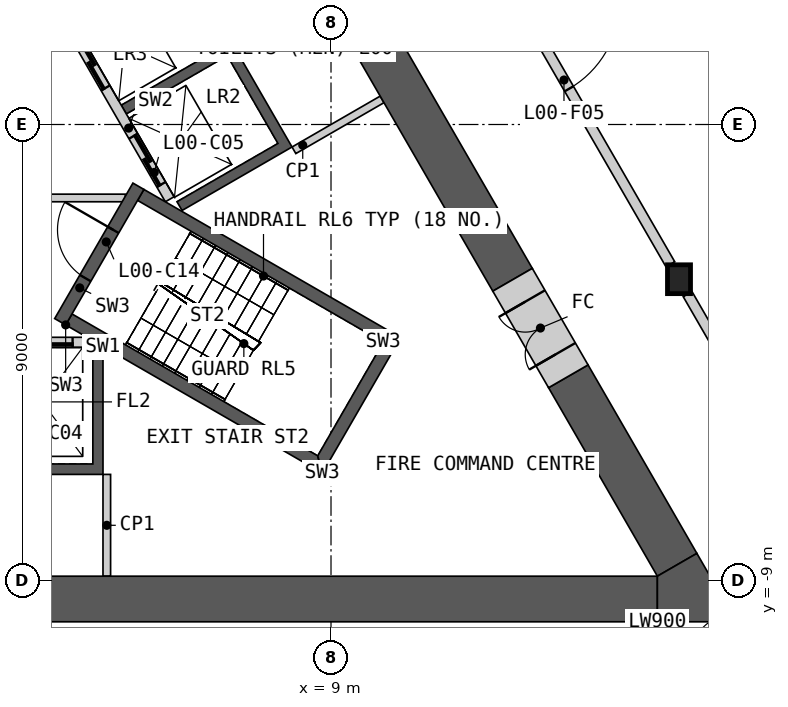
"""IFC4 building model, lengths in metres.
Left out: names, types, materials, properties, quantities, classifications, styles, units other than length and angle.
Written with IfcOpenShell. Run it as: python <this file> out.ifc"""

import sys

from ifc_helpers import new_model, si_unit, direction, frame, frame_2d, origin, origin_2d, place, context, subcontext, project, spatial, polyline, rectangle, i_section, outline, extrude, element, fill, save


model = new_model("IFC4")
c1 = context("Model", 3, precision=1e-05, world=origin(), true_north=direction((0.0, 1.0)))
c2 = subcontext(c1, "Body", "Model", "MODEL_VIEW")
j1 = project(units=[si_unit("LENGTHUNIT", "METRE"), si_unit("PLANEANGLEUNIT", "RADIAN")], contexts=[c1])
p1 = place(None, origin())
s1 = spatial("IfcSite", under=j1, at=p1, CompositionType="ELEMENT")
p2 = place(p1, origin())
s2 = spatial("IfcBuilding", under=s1, at=p2, CompositionType="ELEMENT")
p3 = place(p2, origin())
s3 = spatial("IfcBuildingStorey", under=s2, at=p3, CompositionType="ELEMENT", Elevation=0.0)
p4 = place(p3, frame((15.868, -3.054, 0.0), z_axis=(0.0, 0.0, 1.0), x_axis=(1.0, 0.0, 0.0)))
e1 = element("IfcColumn", 1, at=p4, inside=s3, PredefinedType="COLUMN", context=c2, shape_type="SweptSolid", body=[
    extrude(i_section(OverallWidth=0.454, OverallDepth=0.57, WebThickness=0.078, FlangeThickness=0.125, at=origin_2d()), origin(), (0.0, 0.0, 1.0), 10.0),
])
p5 = place(p3, origin())
e2 = element("IfcWall", 2, at=p5, inside=s3, PredefinedType="SHEAR", context=c2, shape_type="SweptSolid", body=[
    extrude(outline(polyline([(4.5, -4.4), (4.5, -6.906), (-4.5, -6.906), (-4.5, -4.4), (-4.3, -4.4), (-4.3, -6.7), (-2.3, -6.7), (-2.3, -4.4), (-2.1, -4.4), (-2.1, -6.7), (-0.1, -6.7), (-0.1, -4.4), (0.1, -4.4), (0.1, -6.7), (2.1, -6.7), (2.1, -4.4), (2.3, -4.4), (2.3, -6.7), (4.3, -6.7), (4.3, -4.4), (4.5, -4.4)])), origin(), (0.0, 0.0, 1.0), 9.55),
])
p6 = place(p3, frame((-4.187, -4.3, 0.0), z_axis=(0.0, 0.0, 1.0), x_axis=(1.0, 0.0, 0.0)))
e3 = element("IfcWall", 3, at=p6, inside=s3, PredefinedType="SOLIDWALL", context=c2, shape_type="SweptSolid", body=[
    extrude(rectangle(XDim=8.373, YDim=0.2, at=frame_2d((4.187, 0.0))), origin(), (0.0, 0.0, 1.0), 9.55),
])
p7 = place(p6, frame((0.287, 0.0, 0.0)))
e4 = element("IfcOpeningElement", 4, at=p7, cuts=e3, PredefinedType="OPENING", context=c2, shape_type="SweptSolid", body=[
    extrude(rectangle(XDim=1.2, YDim=2.1, at=frame_2d((0.6, 1.05))), frame((0.0, 0.11, 0.0), z_axis=(0.0, -1.0, 0.0), x_axis=(1.0, 0.0, 0.0)), (0.0, 0.0, 1.0), 0.22),
])
p8 = place(p6, frame((2.387, 0.0, 0.0)))
e5 = element("IfcOpeningElement", 5, at=p8, cuts=e3, PredefinedType="OPENING", context=c2, shape_type="SweptSolid", body=[
    extrude(rectangle(XDim=1.4, YDim=2.1, at=frame_2d((0.7, 1.05))), frame((0.0, 0.11, 0.0), z_axis=(0.0, -1.0, 0.0), x_axis=(1.0, 0.0, 0.0)), (0.0, 0.0, 1.0), 0.22),
])
p9 = place(p6, frame((4.737, 0.0, 0.0)))
e6 = element("IfcOpeningElement", 6, at=p9, cuts=e3, PredefinedType="OPENING", context=c2, shape_type="SweptSolid", body=[
    extrude(rectangle(XDim=1.1, YDim=2.1, at=frame_2d((0.55, 1.05))), frame((0.0, 0.11, 0.0), z_axis=(0.0, -1.0, 0.0), x_axis=(1.0, 0.0, 0.0)), (0.0, 0.0, 1.0), 0.22),
])
p10 = place(p6, frame((6.887, 0.0, 0.0)))
e7 = element("IfcOpeningElement", 7, at=p10, cuts=e3, PredefinedType="OPENING", context=c2, shape_type="SweptSolid", body=[
    extrude(rectangle(XDim=1.2, YDim=2.1, at=frame_2d((0.6, 1.05))), frame((0.0, 0.11, 0.0), z_axis=(0.0, -1.0, 0.0), x_axis=(1.0, 0.0, 0.0)), (0.0, 0.0, 1.0), 0.22),
])
p11 = place(p3, origin())
e8 = element("IfcWall", 8, at=p11, inside=s3, PredefinedType="SHEAR", context=c2, shape_type="SweptSolid", body=[
    extrude(outline(polyline([(2.66, 4.192), (4.831, 5.445), (8.231, -0.444), (6.061, -1.697), (5.96, -1.524), (7.952, -0.374), (6.952, 1.358), (4.96, 0.208), (4.861, 0.381), (6.852, 1.531), (5.852, 3.263), (3.861, 2.113), (3.76, 2.287), (5.752, 3.437), (4.752, 5.169), (2.76, 4.019), (2.66, 4.192)])), origin(), (0.0, 0.0, 1.0), 9.55),
])
p12 = place(p3, frame((5.817, -1.476, 0.0), z_axis=(0.0, 0.0, 1.0), x_axis=(-0.499992876559, 0.866029516466, 0.0)))
e9 = element("IfcWall", 9, at=p12, inside=s3, PredefinedType="SOLIDWALL", context=c2, shape_type="SweptSolid", body=[
    extrude(rectangle(XDim=6.486, YDim=0.2, at=frame_2d((3.243, 0.0))), origin(), (0.0, 0.0, 1.0), 9.55),
])
p13 = place(p12, frame((0.337, 0.0, 0.0)))
e10 = element("IfcOpeningElement", 10, at=p13, cuts=e9, PredefinedType="OPENING", context=c2, shape_type="SweptSolid", body=[
    extrude(rectangle(XDim=1.1, YDim=2.1, at=frame_2d((0.55, 1.05))), frame((0.0, 0.11, 0.0), z_axis=(0.0, -1.0, 0.0), x_axis=(1.0, 0.0, 0.0)), (0.0, 0.0, 1.0), 0.22),
])
p14 = place(p12, frame((2.537, 0.0, 0.0)))
e11 = element("IfcOpeningElement", 11, at=p14, cuts=e9, PredefinedType="OPENING", context=c2, shape_type="SweptSolid", body=[
    extrude(rectangle(XDim=1.1, YDim=2.1, at=frame_2d((0.55, 1.05))), frame((0.0, 0.11, 0.0), z_axis=(0.0, -1.0, 0.0), x_axis=(1.0, 0.0, 0.0)), (0.0, 0.0, 1.0), 0.22),
])
p15 = place(p12, frame((4.737, 0.0, 0.0)))
e12 = element("IfcOpeningElement", 12, at=p15, cuts=e9, PredefinedType="OPENING", context=c2, shape_type="SweptSolid", body=[
    extrude(rectangle(XDim=1.1, YDim=2.1, at=frame_2d((0.55, 1.05))), frame((0.0, 0.11, 0.0), z_axis=(0.0, -1.0, 0.0), x_axis=(1.0, 0.0, 0.0)), (0.0, 0.0, 1.0), 0.22),
])
p16 = place(p3, frame((-4.941, -1.45, 0.0), z_axis=(0.0, 0.0, 1.0), x_axis=(1.0, 0.0, 0.0)))
e13 = element("IfcWall", 13, at=p16, inside=s3, PredefinedType="PARTITIONING", context=c2, shape_type="SweptSolid", body=[
    extrude(rectangle(XDim=9.882, YDim=0.15, at=frame_2d((4.941, 0.0))), origin(), (0.0, 0.0, 1.0), 9.55),
])
p17 = place(p16, frame((4.391, 0.0, 0.0)))
e14 = element("IfcOpeningElement", 14, at=p17, cuts=e13, PredefinedType="OPENING", context=c2, shape_type="SweptSolid", body=[
    extrude(rectangle(XDim=1.1, YDim=2.1, at=frame_2d((0.55, 1.05))), frame((0.0, 0.085, 0.0), z_axis=(0.0, -1.0, 0.0), x_axis=(1.0, 0.0, 0.0)), (0.0, 0.0, 1.0), 0.17),
])
p18 = place(p16, frame((0.341, 0.0, 0.0)))
e15 = element("IfcOpeningElement", 15, at=p18, cuts=e13, PredefinedType="OPENING", context=c2, shape_type="SweptSolid", body=[
    extrude(rectangle(XDim=1.8, YDim=2.1, at=frame_2d((0.9, 1.05))), frame((0.0, 0.085, 0.0), z_axis=(0.0, -1.0, 0.0), x_axis=(1.0, 0.0, 0.0)), (0.0, 0.0, 1.0), 0.17),
])
p19 = place(p3, origin())
e16 = element("IfcWall", 16, at=p19, inside=s3, PredefinedType="SHEAR", context=c2, shape_type="SweptSolid", body=[
    extrude(outline(polyline([(3.763, -3.956), (8.83, -6.881), (8.738, -6.539), (3.888, -3.739), (3.763, -3.956)])), origin(), (0.0, 0.0, 1.0), 9.55),
])
p20 = place(p3, origin())
e17 = element("IfcWall", 17, at=p20, inside=s3, PredefinedType="SHEAR", context=c2, shape_type="SweptSolid", body=[
    extrude(outline(polyline([(8.83, -6.881), (10.374, -4.206), (10.032, -4.298), (8.738, -6.539), (8.83, -6.881)])), origin(), (0.0, 0.0, 1.0), 9.55),
])
p21 = place(p3, origin())
e18 = element("IfcWall", 18, at=p21, inside=s3, PredefinedType="SHEAR", context=c2, shape_type="SweptSolid", body=[
    extrude(outline(polyline([(10.032, -4.298), (10.374, -4.206), (5.307, -1.281), (5.182, -1.498), (10.032, -4.298)])), origin(), (0.0, 0.0, 1.0), 9.55),
])
p22 = place(p3, frame((3.655, -3.893, 0.0), z_axis=(0.0, 0.0, 1.0), x_axis=(0.499982516597, 0.866035497597, 0.0)))
e19 = element("IfcWall", 19, at=p22, inside=s3, PredefinedType="SHEAR", context=c2, shape_type="SweptSolid", body=[
    extrude(rectangle(XDim=3.088, YDim=0.25, at=frame_2d((1.544, 0.0))), origin(), (0.0, 0.0, 1.0), 9.55),
])
p23 = place(p22, frame((0.994, 0.0, 0.0)))
e20 = element("IfcOpeningElement", 20, at=p23, cuts=e19, PredefinedType="OPENING", context=c2, shape_type="SweptSolid", body=[
    extrude(rectangle(XDim=1.1, YDim=2.1, at=frame_2d((0.55, 1.05))), frame((0.0, 0.135, 0.0), z_axis=(0.0, -1.0, 0.0), x_axis=(1.0, 0.0, 0.0)), (0.0, 0.0, 1.0), 0.27),
])
p24 = place(p3, frame((4.575, -6.906, 0.0), z_axis=(0.0, 0.0, 1.0), x_axis=(0.0, -1.0, 0.0)))
e21 = element("IfcWall", 21, at=p24, inside=s3, PredefinedType="PARTITIONING", context=c2, shape_type="SweptSolid", body=[
    extrude(rectangle(XDim=2.009, YDim=0.15, at=frame_2d((1.004, 0.0))), origin(), (0.0, 0.0, 1.0), 9.55),
])
p25 = place(p3, frame((8.268, -0.509, 0.0), z_axis=(0.0, 0.0, 1.0), x_axis=(0.866035824272, 0.499981950752, 0.0)))
e22 = element("IfcWall", 22, at=p25, inside=s3, PredefinedType="PARTITIONING", context=c2, shape_type="SweptSolid", body=[
    extrude(rectangle(XDim=2.009, YDim=0.15, at=frame_2d((1.004, 0.0))), origin(), (0.0, 0.0, 1.0), 9.55),
])
p26 = place(p3, frame((1.1, -9.365, 0.0), z_axis=(0.0, 0.0, 1.0), x_axis=(1.0, 0.0, 0.0)))
e23 = element("IfcWall", 23, at=p26, inside=s3, PredefinedType="SHEAR", context=c2, shape_type="SweptSolid", body=[
    extrude(rectangle(XDim=14.341, YDim=0.9, at=frame_2d((7.17, 0.0))), origin(), (0.0, 0.0, 1.0), 9.55),
])
p27 = place(p3, frame((12.583, -3.065, 0.0), z_axis=(0.0, 0.0, 1.0), x_axis=(-0.49998745675, 0.866032645512, 0.0)))
e24 = element("IfcWall", 24, at=p27, inside=s3, PredefinedType="SHEAR", context=c2, shape_type="SweptSolid", body=[
    extrude(rectangle(XDim=6.646, YDim=0.9, at=frame_2d((3.323, 0.0))), origin(), (0.0, 0.0, 1.0), 9.55),
])
p28 = place(p3, frame((15.831, -8.69, 0.0), z_axis=(0.0, 0.0, 1.0), x_axis=(-0.499996331799, 0.866027521611, 0.0)))
e25 = element("IfcWall", 25, at=p28, inside=s3, PredefinedType="SHEAR", context=c2, shape_type="SweptSolid", body=[
    extrude(rectangle(XDim=4.295, YDim=0.9, at=frame_2d((2.148, 0.0))), origin(), (0.0, 0.0, 1.0), 9.55),
])
p29 = place(p3, origin())
e26 = element("IfcWall", 26, at=p29, inside=s3, PredefinedType="SHEAR", context=c2, shape_type="SweptSolid", body=[
    extrude(outline(polyline([(15.441, -9.815), (15.441, -8.915), (16.221, -8.465), (17.0, -9.815), (15.441, -9.815)])), origin(), (0.0, 0.0, 1.0), 9.55),
])
p30 = place(p3, frame((13.683, -4.97, 0.0), z_axis=(0.0, 0.0, 1.0), x_axis=(-0.50002983664, 0.866008176907, 0.0)))
e27 = element("IfcWall", 27, at=p30, inside=s3, PredefinedType="SHEAR", context=c2, shape_type="SweptSolid", body=[
    extrude(rectangle(XDim=2.2, YDim=0.9, at=frame_2d((1.1, 0.0))), origin(), (0.0, 0.0, 1.0), 9.55),
])
p31 = place(p30, frame((0.5, 0.0, 0.0)))
e28 = element("IfcOpeningElement", 28, at=p31, cuts=e27, PredefinedType="OPENING", context=c2, shape_type="SweptSolid", body=[
    extrude(rectangle(XDim=1.2, YDim=2.1, at=frame_2d((0.6, 1.05))), frame((0.0, 0.46, 0.0), z_axis=(0.0, -1.0, 0.0), x_axis=(1.0, 0.0, 0.0)), (0.0, 0.0, 1.0), 0.92),
])
p32 = place(p3, frame((10.749, 5.813, 0.0), z_axis=(0.0, 0.0, 1.0), x_axis=(0.500004292778, -0.866022925334, 0.0)))
e29 = element("IfcWall", 29, at=p32, inside=s3, PredefinedType="PARTITIONING", context=c2, shape_type="SweptSolid", body=[
    extrude(rectangle(XDim=9.898, YDim=0.2, at=frame_2d((4.949, 0.0))), origin(), (0.0, 0.0, 1.0), 9.55),
])
p33 = place(p32, frame((3.898, 0.0, 0.0)))
e30 = element("IfcOpeningElement", 30, at=p33, cuts=e29, PredefinedType="OPENING", context=c2, shape_type="SweptSolid", body=[
    extrude(rectangle(XDim=2.0, YDim=2.1, at=frame_2d((1.0, 1.05))), frame((0.0, 0.11, 0.0), z_axis=(0.0, -1.0, 0.0), x_axis=(1.0, 0.0, 0.0)), (0.0, 0.0, 1.0), 0.22),
])
p34 = place(p3, frame((16.038, -3.348, 0.0), z_axis=(0.0, 0.0, 1.0), x_axis=(0.499988314375, -0.866032150378, 0.0)))
e31 = element("IfcWall", 31, at=p34, inside=s3, PredefinedType="PARTITIONING", context=c2, shape_type="SweptSolid", body=[
    extrude(rectangle(XDim=6.412, YDim=0.2, at=frame_2d((3.206, 0.0))), origin(), (0.0, 0.0, 1.0), 9.55),
])
p35 = place(p10, origin())
e32 = element("IfcDoor", 32, at=p35, inside=s3, OperationType="SLIDING_TO_LEFT", PredefinedType="DOOR", context=c2, shape_type="SweptSolid", body=[
    extrude(rectangle(XDim=1.2, YDim=2.1, at=frame_2d((0.6, 1.05))), frame((0.0, 0.025, 0.0), z_axis=(0.0, -1.0, 0.0), x_axis=(1.0, 0.0, 0.0)), (0.0, 0.0, 1.0), 0.05),
])
fill(e7, e32)
p36 = place(p13, origin())
e33 = element("IfcDoor", 33, at=p36, inside=s3, OperationType="SLIDING_TO_LEFT", PredefinedType="DOOR", context=c2, shape_type="SweptSolid", body=[
    extrude(rectangle(XDim=1.1, YDim=2.1, at=frame_2d((0.55, 1.05))), frame((0.0, 0.025, 0.0), z_axis=(0.0, -1.0, 0.0), x_axis=(1.0, 0.0, 0.0)), (0.0, 0.0, 1.0), 0.05),
])
fill(e10, e33)
p37 = place(p14, origin())
e34 = element("IfcDoor", 34, at=p37, inside=s3, OperationType="SLIDING_TO_LEFT", PredefinedType="DOOR", context=c2, shape_type="SweptSolid", body=[
    extrude(rectangle(XDim=1.1, YDim=2.1, at=frame_2d((0.55, 1.05))), frame((0.0, 0.025, 0.0), z_axis=(0.0, -1.0, 0.0), x_axis=(1.0, 0.0, 0.0)), (0.0, 0.0, 1.0), 0.05),
])
fill(e11, e34)
p38 = place(p23, origin())
e35 = element("IfcDoor", 35, at=p38, inside=s3, OperationType="SINGLE_SWING_RIGHT", PredefinedType="DOOR", context=c2, shape_type="SweptSolid", body=[
    extrude(rectangle(XDim=1.1, YDim=2.1, at=frame_2d((0.55, 1.05))), frame((0.0, 0.025, 0.0), z_axis=(0.0, -1.0, 0.0), x_axis=(1.0, 0.0, 0.0)), (0.0, 0.0, 1.0), 0.05),
])
fill(e20, e35)
p39 = place(p31, origin())
e36 = element("IfcDoor", 36, at=p39, inside=s3, OperationType="DOUBLE_DOOR_SINGLE_SWING", PredefinedType="DOOR", context=c2, shape_type="SweptSolid", body=[
    extrude(rectangle(XDim=1.2, YDim=2.1, at=frame_2d((0.6, 1.05))), frame((0.0, 0.205, 0.0), z_axis=(0.0, -1.0, 0.0), x_axis=(1.0, 0.0, 0.0)), (0.0, 0.0, 1.0), 0.05),
])
fill(e28, e36)
p40 = place(p33, origin())
e37 = element("IfcDoor", 37, at=p40, inside=s3, OperationType="DOUBLE_DOOR_SINGLE_SWING", PredefinedType="DOOR", context=c2, shape_type="SweptSolid", body=[
    extrude(rectangle(XDim=2.0, YDim=2.1, at=frame_2d((1.0, 1.05))), frame((0.0, 0.025, 0.0), z_axis=(0.0, -1.0, 0.0), x_axis=(1.0, 0.0, 0.0)), (0.0, 0.0, 1.0), 0.05),
])
fill(e30, e37)
save(model, sys.argv[1])
